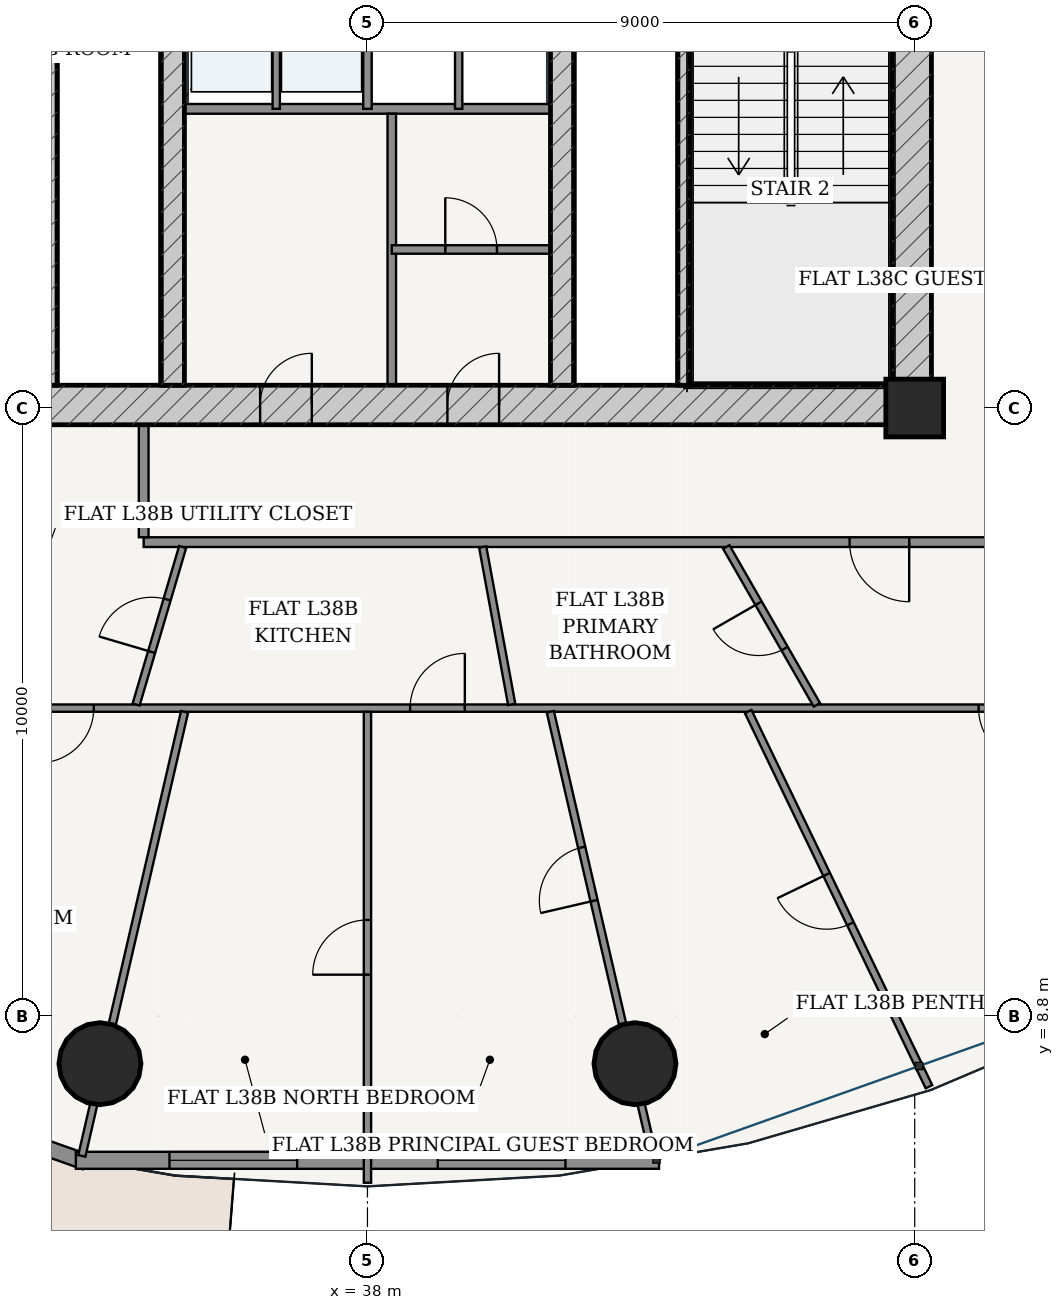
"""IFC4 building model, lengths in metres.
Left out: names, types, materials, properties, quantities, classifications, styles, units other than length and angle.
Written with IfcOpenShell. Run it as: python <this file> out.ifc"""

import sys

from ifc_helpers import new_model, si_unit, direction, frame, frame_2d, origin, origin_2d, place, context, subcontext, project, spatial, rectangle, hollow_circle, extrude, source, transform, mapped, element, fill, save


model = new_model("IFC4")
c1 = context("Model", 3, precision=1e-05, world=origin(), true_north=direction((-0.2419218956, 0.970295726276)))
c2 = subcontext(c1, "Body", "Model", "MODEL_VIEW")
j1 = project(units=[si_unit("LENGTHUNIT", "METRE"), si_unit("PLANEANGLEUNIT", "RADIAN")], contexts=[c1])
p1 = place(None, origin())
s1 = spatial("IfcSite", under=j1, at=p1, CompositionType="ELEMENT")
p2 = place(p1, origin())
s2 = spatial("IfcBuilding", under=s1, at=p2, CompositionType="ELEMENT")
p3 = place(p2, frame((0.0, 0.0, 146.2)))
s3 = spatial("IfcBuildingStorey", under=s2, at=p3, CompositionType="ELEMENT", Elevation=146.2)
p4 = place(p3, frame((47.0, 18.8, 0.0), z_axis=(0.0, 0.0, 1.0), x_axis=(1.0, 0.0, 0.0)))
e1 = element("IfcColumn", 1, at=p4, inside=s3, PredefinedType="COLUMN", context=c2, shape_type="SweptSolid", body=[
    extrude(rectangle(XDim=0.95, YDim=0.95, at=origin_2d()), origin(), (0.0, 0.0, 1.0), 3.6),
])
p5 = place(p3, frame((28.725, 18.85, 0.0), z_axis=(0.0, 0.0, 1.0), x_axis=(1.0, 0.0, 0.0)))
e2 = element("IfcWall", 2, at=p5, inside=s3, PredefinedType="SHEAR", context=c2, shape_type="SweptSolid", body=[
    extrude(rectangle(XDim=18.55, YDim=0.65, at=frame_2d((9.275, 0.0))), origin(), (0.0, 0.0, 1.0), 3.33),
])
p6 = place(p5, frame((7.51, 0.0, 0.0)))
e3 = element("IfcOpeningElement", 3, at=p6, cuts=e2, PredefinedType="OPENING", context=c2, shape_type="SweptSolid", body=[
    extrude(rectangle(XDim=0.85, YDim=2.1, at=frame_2d((0.425, 1.05))), frame((0.0, 0.335, 0.0), z_axis=(0.0, -1.0, 0.0), x_axis=(1.0, 0.0, 0.0)), (0.0, 0.0, 1.0), 0.67),
])
p7 = place(p5, frame((10.59, 0.0, 0.0)))
e4 = element("IfcOpeningElement", 4, at=p7, cuts=e2, PredefinedType="OPENING", context=c2, shape_type="SweptSolid", body=[
    extrude(rectangle(XDim=0.85, YDim=2.1, at=frame_2d((0.425, 1.05))), frame((0.0, 0.335, 0.0), z_axis=(0.0, -1.0, 0.0), x_axis=(1.0, 0.0, 0.0)), (0.0, 0.0, 1.0), 0.67),
])
p8 = place(p3, frame((46.95, 19.175, 0.0), z_axis=(0.0, 0.0, 1.0), x_axis=(0.0, 1.0, 0.0)))
e5 = element("IfcWall", 5, at=p8, inside=s3, PredefinedType="SHEAR", context=c2, shape_type="SweptSolid", body=[
    extrude(rectangle(XDim=15.25, YDim=0.65, at=frame_2d((7.625, 0.0))), origin(), (0.0, 0.0, 1.0), 3.33),
])
p9 = place(p8, frame((9.875, 0.0, 0.0)))
e6 = element("IfcOpeningElement", 6, at=p9, cuts=e5, PredefinedType="OPENING", context=c2, shape_type="SweptSolid", body=[
    extrude(rectangle(XDim=1.5, YDim=2.2, at=frame_2d((0.75, 1.1))), frame((0.0, 0.335, 0.0), z_axis=(0.0, -1.0, 0.0), x_axis=(1.0, 0.0, 0.0)), (0.0, 0.0, 1.0), 0.67),
])
for number, where, z_axis, x_axis in (
    (7, (32.795, 19.175, 0.0), (0.0, 0.0, 1.0), (0.0, 1.0, 0.0)),
    (8, (43.205, 19.175, 0.0), (0.0, 0.0, 1.0), (0.0, 1.0, 0.0)),
):
    element("IfcWall", number, at=place(p3, frame(where, z_axis=z_axis, x_axis=x_axis)), inside=s3, PredefinedType="SOLIDWALL", context=c2, shape_type="SweptSolid", body=[
        extrude(rectangle(XDim=7.375, YDim=0.2, at=frame_2d((3.688, 0.0))), origin(), (0.0, 0.0, 1.0), 3.33),
    ])
p10 = place(p3, frame((34.8, 19.175, 0.0), z_axis=(0.0, 0.0, 1.0), x_axis=(0.0, 1.0, 0.0)))
e9 = element("IfcWall", 9, at=p10, inside=s3, PredefinedType="SHEAR", context=c2, shape_type="SweptSolid", body=[
    extrude(rectangle(XDim=15.25, YDim=0.38, at=frame_2d((7.625, 0.0))), origin(), (0.0, 0.0, 1.0), 3.33),
])
p11 = place(p10, frame((7.8, 0.0, 0.0)))
e10 = element("IfcOpeningElement", 10, at=p11, cuts=e9, PredefinedType="OPENING", context=c2, shape_type="SweptSolid", body=[
    extrude(rectangle(XDim=1.05, YDim=2.15, at=frame_2d((0.525, 1.075))), frame((0.0, 0.2, 0.0), z_axis=(0.0, -1.0, 0.0), x_axis=(1.0, 0.0, 0.0)), (0.0, 0.0, 1.0), 0.4),
])
p12 = place(p3, frame((41.2, 19.175, 0.0), z_axis=(0.0, 0.0, 1.0), x_axis=(0.0, 1.0, 0.0)))
e11 = element("IfcWall", 11, at=p12, inside=s3, PredefinedType="SHEAR", context=c2, shape_type="SweptSolid", body=[
    extrude(rectangle(XDim=15.25, YDim=0.38, at=frame_2d((7.625, 0.0))), origin(), (0.0, 0.0, 1.0), 3.33),
])
p13 = place(p12, frame((7.8, 0.0, 0.0)))
e12 = element("IfcOpeningElement", 12, at=p13, cuts=e11, PredefinedType="OPENING", context=c2, shape_type="SweptSolid", body=[
    extrude(rectangle(XDim=1.05, YDim=2.15, at=frame_2d((0.525, 1.075))), frame((0.0, 0.2, 0.0), z_axis=(0.0, -1.0, 0.0), x_axis=(1.0, 0.0, 0.0)), (0.0, 0.0, 1.0), 0.4),
])
for number, where, z_axis, x_axis in (
    (13, (33.601, 8.018, 0.0), (0.0, 0.0, 1.0), (1.0, 0.0, 0.0)),
    (14, (42.399, 8.018, 0.0), (0.0, 0.0, 1.0), (1.0, 0.0, 0.0)),
):
    element("IfcColumn", number, at=place(p3, frame(where, z_axis=z_axis, x_axis=x_axis)), inside=s3, PredefinedType="COLUMN", context=c2, shape_type="SweptSolid", body=[
        extrude(hollow_circle(Radius=0.675, WallThickness=0.042, at=origin_2d()), origin(), (0.0, 0.0, 1.0), 3.6),
    ])
p14 = place(p3, frame((24.497, 9.557, 0.0), z_axis=(0.0, 0.0, 1.0), x_axis=(0.942103604331, -0.335321932934, 0.0)))
e15 = element("IfcWall", 15, at=p14, inside=s3, PredefinedType="SOLIDWALL", context=c2, shape_type="SweptSolid", body=[
    extrude(rectangle(XDim=9.408, YDim=0.26, at=frame_2d((4.704, 0.0))), origin(), (0.0, 0.0, 1.0), 3.33),
])
p15 = place(p14, frame((4.029, 0.0, 0.0)))
e16 = element("IfcOpeningElement", 16, at=p15, cuts=e15, PredefinedType="OPENING", context=c2, shape_type="SweptSolid", body=[
    extrude(rectangle(XDim=1.35, YDim=2.2, at=frame_2d((0.675, 1.1))), frame((0.0, 0.14, 0.0), z_axis=(0.0, -1.0, 0.0), x_axis=(1.0, 0.0, 0.0)), (0.0, 0.0, 1.0), 0.28),
])
p16 = place(p3, frame((33.205, 6.429, 0.0), z_axis=(0.0, 0.0, 1.0), x_axis=(1.0, 0.0, 0.0)))
e17 = element("IfcWall", 17, at=p16, inside=s3, PredefinedType="SOLIDWALL", context=c2, shape_type="SweptSolid", body=[
    extrude(rectangle(XDim=9.591, YDim=0.28, at=frame_2d((4.795, 0.0))), origin(), (0.0, 0.0, 1.0), 3.33),
])
p17 = place(p16, frame((1.54, 0.0, 0.85)))
e18 = element("IfcOpeningElement", 18, at=p17, cuts=e17, PredefinedType="OPENING", context=c2, shape_type="SweptSolid", body=[
    extrude(rectangle(XDim=2.1, YDim=1.95, at=frame_2d((1.05, 0.975))), frame((0.0, 0.15, 0.0), z_axis=(0.0, -1.0, 0.0), x_axis=(1.0, 0.0, 0.0)), (0.0, 0.0, 1.0), 0.3),
])
p18 = place(p16, frame((5.951, 0.0, 0.85)))
e19 = element("IfcOpeningElement", 19, at=p18, cuts=e17, PredefinedType="OPENING", context=c2, shape_type="SweptSolid", body=[
    extrude(rectangle(XDim=2.1, YDim=1.95, at=frame_2d((1.05, 0.975))), frame((0.0, 0.15, 0.0), z_axis=(0.0, -1.0, 0.0), x_axis=(1.0, 0.0, 0.0)), (0.0, 0.0, 1.0), 0.3),
])
p19 = place(p3, frame((34.99, 23.72, 0.0), z_axis=(0.0, 0.0, 1.0), x_axis=(1.0, 0.0, 0.0)))
e20 = element("IfcWall", 20, at=p19, inside=s3, PredefinedType="PARTITIONING", context=c2, shape_type="SweptSolid", body=[
    extrude(rectangle(XDim=6.02, YDim=0.16, at=frame_2d((3.01, 0.0))), origin(), (0.0, 0.0, 1.0), 3.33),
])
p20 = place(p3, frame((36.5, 23.72, 0.0), z_axis=(0.0, 0.0, 1.0), x_axis=(0.0, 1.0, 0.0)))
e21 = element("IfcWall", 21, at=p20, inside=s3, PredefinedType="PARTITIONING", context=c2, shape_type="SweptSolid", body=[
    extrude(rectangle(XDim=2.56, YDim=0.12, at=frame_2d((1.28, 0.0))), origin(), (0.0, 0.0, 1.0), 3.33),
])
p21 = place(p3, frame((38.0, 23.72, 0.0), z_axis=(0.0, 0.0, 1.0), x_axis=(0.0, 1.0, 0.0)))
e22 = element("IfcWall", 22, at=p21, inside=s3, PredefinedType="PARTITIONING", context=c2, shape_type="SweptSolid", body=[
    extrude(rectangle(XDim=2.56, YDim=0.14, at=frame_2d((1.28, 0.0))), origin(), (0.0, 0.0, 1.0), 3.33),
])
p22 = place(p3, frame((39.5, 23.72, 0.0), z_axis=(0.0, 0.0, 1.0), x_axis=(0.0, 1.0, 0.0)))
e23 = element("IfcWall", 23, at=p22, inside=s3, PredefinedType="PARTITIONING", context=c2, shape_type="SweptSolid", body=[
    extrude(rectangle(XDim=2.56, YDim=0.12, at=frame_2d((1.28, 0.0))), origin(), (0.0, 0.0, 1.0), 3.33),
])
p23 = place(p3, frame((38.4, 19.175, 0.0), z_axis=(0.0, 0.0, 1.0), x_axis=(0.0, 1.0, 0.0)))
e24 = element("IfcWall", 24, at=p23, inside=s3, PredefinedType="PARTITIONING", context=c2, shape_type="SweptSolid", body=[
    extrude(rectangle(XDim=4.465, YDim=0.14, at=frame_2d((2.232, 0.0))), origin(), (0.0, 0.0, 1.0), 3.33),
])
p24 = place(p3, frame((38.4, 21.407, 0.0), z_axis=(0.0, 0.0, 1.0), x_axis=(1.0, 0.0, 0.0)))
e25 = element("IfcWall", 25, at=p24, inside=s3, PredefinedType="PARTITIONING", context=c2, shape_type="SweptSolid", body=[
    extrude(rectangle(XDim=2.61, YDim=0.14, at=frame_2d((1.305, 0.0))), origin(), (0.0, 0.0, 1.0), 3.33),
])
p25 = place(p24, frame((0.88, 0.0, 0.0)))
e26 = element("IfcOpeningElement", 26, at=p25, cuts=e25, PredefinedType="OPENING", context=c2, shape_type="SweptSolid", body=[
    extrude(rectangle(XDim=0.85, YDim=2.1, at=frame_2d((0.425, 1.05))), frame((0.0, 0.08, 0.0), z_axis=(0.0, -1.0, 0.0), x_axis=(1.0, 0.0, 0.0)), (0.0, 0.0, 1.0), 0.16),
])
p26 = place(p3, frame((34.32, 16.595, 0.0), z_axis=(0.0, 0.0, 1.0), x_axis=(1.0, 0.0, 0.0)))
e27 = element("IfcWall", 27, at=p26, inside=s3, PredefinedType="PARTITIONING", context=c2, shape_type="SweptSolid", body=[
    extrude(rectangle(XDim=14.885, YDim=0.16, at=frame_2d((7.442, 0.0))), origin(), (0.0, 0.0, 1.0), 2.776),
])
p27 = place(p26, frame((11.609, 0.0, 0.0)))
e28 = element("IfcOpeningElement", 28, at=p27, cuts=e27, PredefinedType="OPENING", context=c2, shape_type="SweptSolid", body=[
    extrude(rectangle(XDim=0.98, YDim=2.2, at=frame_2d((0.49, 1.1))), frame((0.0, 0.09, 0.0), z_axis=(0.0, -1.0, 0.0), x_axis=(1.0, 0.0, 0.0)), (0.0, 0.0, 1.0), 0.18),
])
p28 = place(p3, frame((34.32, 16.675, 0.0), z_axis=(0.0, 0.0, 1.0), x_axis=(0.0, 1.0, 0.0)))
e29 = element("IfcWall", 29, at=p28, inside=s3, PredefinedType="PARTITIONING", context=c2, shape_type="SweptSolid", body=[
    extrude(rectangle(XDim=1.85, YDim=0.16, at=frame_2d((0.925, 0.0))), origin(), (0.0, 0.0, 1.0), 3.33),
])
p29 = place(p3, frame((51.935, 13.865, 0.0), z_axis=(0.0, 0.0, 1.0), x_axis=(-1.0, 0.0, 0.0)))
e30 = element("IfcWall", 30, at=p29, inside=s3, PredefinedType="PARTITIONING", context=c2, shape_type="SweptSolid", body=[
    extrude(rectangle(XDim=20.345, YDim=0.12, at=frame_2d((10.172, 0.0))), origin(), (0.0, 0.0, 1.0), 2.776),
])
p30 = place(p29, frame((2.985, 0.0, 0.0)))
e31 = element("IfcOpeningElement", 31, at=p30, cuts=e30, PredefinedType="OPENING", context=c2, shape_type="SweptSolid", body=[
    extrude(rectangle(XDim=0.9, YDim=2.15, at=frame_2d((0.45, 1.075))), frame((0.0, 0.07, 0.0), z_axis=(0.0, -1.0, 0.0), x_axis=(1.0, 0.0, 0.0)), (0.0, 0.0, 1.0), 0.14),
])
p31 = place(p29, frame((12.333, 0.0, 0.0)))
e32 = element("IfcOpeningElement", 32, at=p31, cuts=e30, PredefinedType="OPENING", context=c2, shape_type="SweptSolid", body=[
    extrude(rectangle(XDim=0.9, YDim=2.15, at=frame_2d((0.45, 1.075))), frame((0.0, 0.07, 0.0), z_axis=(0.0, -1.0, 0.0), x_axis=(1.0, 0.0, 0.0)), (0.0, 0.0, 1.0), 0.14),
])
p32 = place(p29, frame((18.436, 0.0, 0.0)))
e33 = element("IfcOpeningElement", 33, at=p32, cuts=e30, PredefinedType="OPENING", context=c2, shape_type="SweptSolid", body=[
    extrude(rectangle(XDim=0.9, YDim=2.15, at=frame_2d((0.45, 1.075))), frame((0.0, 0.07, 0.0), z_axis=(0.0, -1.0, 0.0), x_axis=(1.0, 0.0, 0.0)), (0.0, 0.0, 1.0), 0.14),
])
p33 = place(p3, frame((34.992, 13.805, 0.0), z_axis=(0.0, 0.0, 1.0), x_axis=(-0.225447000045, -0.974255433739, 0.0)))
e34 = element("IfcWall", 34, at=p33, inside=s3, PredefinedType="PARTITIONING", context=c2, shape_type="SweptSolid", body=[
    extrude(rectangle(XDim=7.496, YDim=0.12, at=frame_2d((3.748, 0.0))), origin(), (0.0, 0.0, 1.0), 2.776),
])
p34 = place(p3, frame((38.0, 13.803, 0.0), z_axis=(0.0, 0.0, 1.0), x_axis=(0.0, -1.0, 0.0)))
e35 = element("IfcWall", 35, at=p34, inside=s3, PredefinedType="PARTITIONING", context=c2, shape_type="SweptSolid", body=[
    extrude(rectangle(XDim=7.743, YDim=0.12, at=frame_2d((3.872, 0.0))), origin(), (0.0, 0.0, 1.0), 2.846),
])
p35 = place(p34, frame((3.421, 0.0, 0.0)))
e36 = element("IfcOpeningElement", 36, at=p35, cuts=e35, PredefinedType="OPENING", context=c2, shape_type="SweptSolid", body=[
    extrude(rectangle(XDim=0.9, YDim=2.15, at=frame_2d((0.45, 1.075))), frame((0.0, 0.07, 0.0), z_axis=(0.0, -1.0, 0.0), x_axis=(1.0, 0.0, 0.0)), (0.0, 0.0, 1.0), 0.14),
])
p36 = place(p3, frame((41.008, 13.805, 0.0), z_axis=(0.0, 0.0, 1.0), x_axis=(0.225447000045, -0.974255433739, 0.0)))
e37 = element("IfcWall", 37, at=p36, inside=s3, PredefinedType="PARTITIONING", context=c2, shape_type="SweptSolid", body=[
    extrude(rectangle(XDim=7.496, YDim=0.12, at=frame_2d((3.748, 0.0))), origin(), (0.0, 0.0, 1.0), 2.776),
])
p37 = place(p36, frame((2.289, 0.0, 0.0)))
e38 = element("IfcOpeningElement", 38, at=p37, cuts=e37, PredefinedType="OPENING", context=c2, shape_type="SweptSolid", body=[
    extrude(rectangle(XDim=0.9, YDim=2.15, at=frame_2d((0.45, 1.075))), frame((0.0, 0.07, 0.0), z_axis=(0.0, -1.0, 0.0), x_axis=(1.0, 0.0, 0.0)), (0.0, 0.0, 1.0), 0.14),
])
p38 = place(p3, frame((44.26, 13.809, 0.0), z_axis=(0.0, 0.0, 1.0), x_axis=(0.434162832987, -0.900834410118, 0.0)))
e39 = element("IfcWall", 39, at=p38, inside=s3, PredefinedType="PARTITIONING", context=c2, shape_type="SweptSolid", body=[
    extrude(rectangle(XDim=6.849, YDim=0.12, at=frame_2d((3.425, 0.0))), origin(), (0.0, 0.0, 1.0), 2.846),
])
p39 = place(p38, frame((2.975, 0.0, 0.0)))
e40 = element("IfcOpeningElement", 40, at=p39, cuts=e39, PredefinedType="OPENING", context=c2, shape_type="SweptSolid", body=[
    extrude(rectangle(XDim=0.9, YDim=2.15, at=frame_2d((0.45, 1.075))), frame((0.0, 0.07, 0.0), z_axis=(0.0, -1.0, 0.0), x_axis=(1.0, 0.0, 0.0)), (0.0, 0.0, 1.0), 0.14),
])
p40 = place(p3, frame((34.961, 16.515, 0.0), z_axis=(0.0, 0.0, 1.0), x_axis=(-0.283365034326, -0.959012125743, 0.0)))
e41 = element("IfcWall", 41, at=p40, inside=s3, PredefinedType="PARTITIONING", context=c2, shape_type="SweptSolid", body=[
    extrude(rectangle(XDim=2.701, YDim=0.12, at=frame_2d((1.351, 0.0))), origin(), (0.0, 0.0, 1.0), 3.33),
])
p41 = place(p40, frame((0.901, 0.0, 0.0)))
e42 = element("IfcOpeningElement", 42, at=p41, cuts=e41, PredefinedType="OPENING", context=c2, shape_type="SweptSolid", body=[
    extrude(rectangle(XDim=0.9, YDim=2.15, at=frame_2d((0.45, 1.075))), frame((0.0, 0.07, 0.0), z_axis=(0.0, -1.0, 0.0), x_axis=(1.0, 0.0, 0.0)), (0.0, 0.0, 1.0), 0.14),
])
p42 = place(p3, frame((39.895, 16.515, 0.0), z_axis=(0.0, 0.0, 1.0), x_axis=(0.181219081065, -0.983442751083, 0.0)))
e43 = element("IfcWall", 43, at=p42, inside=s3, PredefinedType="PARTITIONING", context=c2, shape_type="SweptSolid", body=[
    extrude(rectangle(XDim=2.633, YDim=0.12, at=frame_2d((1.316, 0.0))), origin(), (0.0, 0.0, 1.0), 3.33),
])
p43 = place(p3, frame((43.901, 16.515, 0.0), z_axis=(0.0, 0.0, 1.0), x_axis=(0.497640283609, -0.86738350695, 0.0)))
e44 = element("IfcWall", 44, at=p43, inside=s3, PredefinedType="PARTITIONING", context=c2, shape_type="SweptSolid", body=[
    extrude(rectangle(XDim=2.993, YDim=0.12, at=frame_2d((1.497, 0.0))), origin(), (0.0, 0.0, 1.0), 3.005),
])
p44 = place(p43, frame((1.067, 0.0, 0.0)))
e45 = element("IfcOpeningElement", 45, at=p44, cuts=e44, PredefinedType="OPENING", context=c2, shape_type="SweptSolid", body=[
    extrude(rectangle(XDim=0.86, YDim=2.15, at=frame_2d((0.43, 1.075))), frame((0.0, 0.07, 0.0), z_axis=(0.0, -1.0, 0.0), x_axis=(1.0, 0.0, 0.0)), (0.0, 0.0, 1.0), 0.14),
])
m1 = source(origin(), c2, "Body", "SweptSolid", [
    extrude(rectangle(XDim=2.1, YDim=1.95, at=frame_2d((1.05, 0.975))), frame((0.0, 0.03, 0.0), z_axis=(0.0, -1.0, 0.0), x_axis=(1.0, 0.0, 0.0)), (0.0, 0.0, 1.0), 0.06),
])
p45 = place(p17, origin())
e46 = element("IfcWindow", 46, at=p45, inside=s3, PartitioningType="SINGLE_PANEL", PredefinedType="WINDOW", context=c2, shape_type="MappedRepresentation", body=[
    mapped(m1, transform((0.0, 0.0, 0.0), scale=1.0)),
])
fill(e18, e46)
p46 = place(p18, origin())
e47 = element("IfcWindow", 47, at=p46, inside=s3, PartitioningType="SINGLE_PANEL", PredefinedType="WINDOW", context=c2, shape_type="MappedRepresentation", body=[
    mapped(m1, transform((0.0, 0.0, 0.0), scale=1.0)),
])
fill(e19, e47)
m2 = source(origin(), c2, "Body", "SweptSolid", [
    extrude(rectangle(XDim=0.85, YDim=2.1, at=frame_2d((0.425, 1.05))), frame((0.0, 0.025, 0.0), z_axis=(0.0, -1.0, 0.0), x_axis=(1.0, 0.0, 0.0)), (0.0, 0.0, 1.0), 0.05),
])
p47 = place(p6, origin())
e48 = element("IfcDoor", 48, at=p47, inside=s3, OperationType="SINGLE_SWING_RIGHT", PredefinedType="DOOR", context=c2, shape_type="MappedRepresentation", body=[
    mapped(m2, transform((0.0, 0.0, 0.0), scale=1.0)),
])
fill(e3, e48)
p48 = place(p7, origin())
e49 = element("IfcDoor", 49, at=p48, inside=s3, OperationType="SINGLE_SWING_RIGHT", PredefinedType="DOOR", context=c2, shape_type="MappedRepresentation", body=[
    mapped(m2, transform((0.0, 0.0, 0.0), scale=1.0)),
])
fill(e4, e49)
p49 = place(p25, origin())
e50 = element("IfcDoor", 50, at=p49, inside=s3, OperationType="SINGLE_SWING_LEFT", PredefinedType="DOOR", context=c2, shape_type="MappedRepresentation", body=[
    mapped(m2, transform((0.0, 0.0, 0.0), scale=1.0)),
])
fill(e26, e50)
m3 = source(origin(), c2, "Body", "SweptSolid", [
    extrude(rectangle(XDim=0.98, YDim=2.2, at=frame_2d((0.49, 1.1))), frame((0.0, 0.025, 0.0), z_axis=(0.0, -1.0, 0.0), x_axis=(1.0, 0.0, 0.0)), (0.0, 0.0, 1.0), 0.05),
])
p50 = place(p27, frame((0.98, 0.0, 0.0), z_axis=(0.0, 0.0, 1.0), x_axis=(-1.0, 0.0, 0.0)))
e51 = element("IfcDoor", 51, at=p50, inside=s3, OperationType="SINGLE_SWING_LEFT", PredefinedType="DOOR", context=c2, shape_type="MappedRepresentation", body=[
    mapped(m3, transform((0.0, 0.0, 0.0), scale=1.0)),
])
fill(e28, e51)
m4 = source(origin(), c2, "Body", "SweptSolid", [
    extrude(rectangle(XDim=0.86, YDim=2.15, at=frame_2d((0.43, 1.075))), frame((0.0, 0.025, 0.0), z_axis=(0.0, -1.0, 0.0), x_axis=(1.0, 0.0, 0.0)), (0.0, 0.0, 1.0), 0.05),
])
p51 = place(p44, frame((0.86, 0.0, 0.0), z_axis=(0.0, 0.0, 1.0), x_axis=(-1.0, 0.0, 0.0)))
e52 = element("IfcDoor", 52, at=p51, inside=s3, OperationType="SINGLE_SWING_RIGHT", PredefinedType="DOOR", context=c2, shape_type="MappedRepresentation", body=[
    mapped(m4, transform((0.0, 0.0, 0.0), scale=1.0)),
])
fill(e45, e52)
m5 = source(origin(), c2, "Body", "SweptSolid", [
    extrude(rectangle(XDim=0.9, YDim=2.15, at=frame_2d((0.45, 1.075))), frame((0.0, 0.025, 0.0), z_axis=(0.0, -1.0, 0.0), x_axis=(1.0, 0.0, 0.0)), (0.0, 0.0, 1.0), 0.05),
])
p52 = place(p30, origin())
e53 = element("IfcDoor", 53, at=p52, inside=s3, OperationType="SINGLE_SWING_LEFT", PredefinedType="DOOR", context=c2, shape_type="MappedRepresentation", body=[
    mapped(m5, transform((0.0, 0.0, 0.0), scale=1.0)),
])
fill(e31, e53)
p53 = place(p39, frame((0.9, 0.0, 0.0), z_axis=(0.0, 0.0, 1.0), x_axis=(-1.0, 0.0, 0.0)))
e54 = element("IfcDoor", 54, at=p53, inside=s3, OperationType="SINGLE_SWING_RIGHT", PredefinedType="DOOR", context=c2, shape_type="MappedRepresentation", body=[
    mapped(m5, transform((0.0, 0.0, 0.0), scale=1.0)),
])
fill(e40, e54)
p54 = place(p37, frame((0.9, 0.0, 0.0), z_axis=(0.0, 0.0, 1.0), x_axis=(-1.0, 0.0, 0.0)))
e55 = element("IfcDoor", 55, at=p54, inside=s3, OperationType="SINGLE_SWING_LEFT", PredefinedType="DOOR", context=c2, shape_type="MappedRepresentation", body=[
    mapped(m5, transform((0.0, 0.0, 0.0), scale=1.0)),
])
fill(e38, e55)
p55 = place(p31, frame((0.9, 0.0, 0.0), z_axis=(0.0, 0.0, 1.0), x_axis=(-1.0, 0.0, 0.0)))
e56 = element("IfcDoor", 56, at=p55, inside=s3, OperationType="SINGLE_SWING_RIGHT", PredefinedType="DOOR", context=c2, shape_type="MappedRepresentation", body=[
    mapped(m5, transform((0.0, 0.0, 0.0), scale=1.0)),
])
fill(e32, e56)
p56 = place(p41, frame((0.9, 0.0, 0.0), z_axis=(0.0, 0.0, 1.0), x_axis=(-1.0, 0.0, 0.0)))
e57 = element("IfcDoor", 57, at=p56, inside=s3, OperationType="SINGLE_SWING_LEFT", PredefinedType="DOOR", context=c2, shape_type="MappedRepresentation", body=[
    mapped(m5, transform((0.0, 0.0, 0.0), scale=1.0)),
])
fill(e42, e57)
p57 = place(p32, origin())
e58 = element("IfcDoor", 58, at=p57, inside=s3, OperationType="SINGLE_SWING_RIGHT", PredefinedType="DOOR", context=c2, shape_type="MappedRepresentation", body=[
    mapped(m5, transform((0.0, 0.0, 0.0), scale=1.0)),
])
fill(e33, e58)
p58 = place(p35, frame((0.9, 0.0, 0.0), z_axis=(0.0, 0.0, 1.0), x_axis=(-1.0, 0.0, 0.0)))
e59 = element("IfcDoor", 59, at=p58, inside=s3, OperationType="SINGLE_SWING_LEFT", PredefinedType="DOOR", context=c2, shape_type="MappedRepresentation", body=[
    mapped(m5, transform((0.0, 0.0, 0.0), scale=1.0)),
])
fill(e36, e59)
save(model, sys.argv[1])
